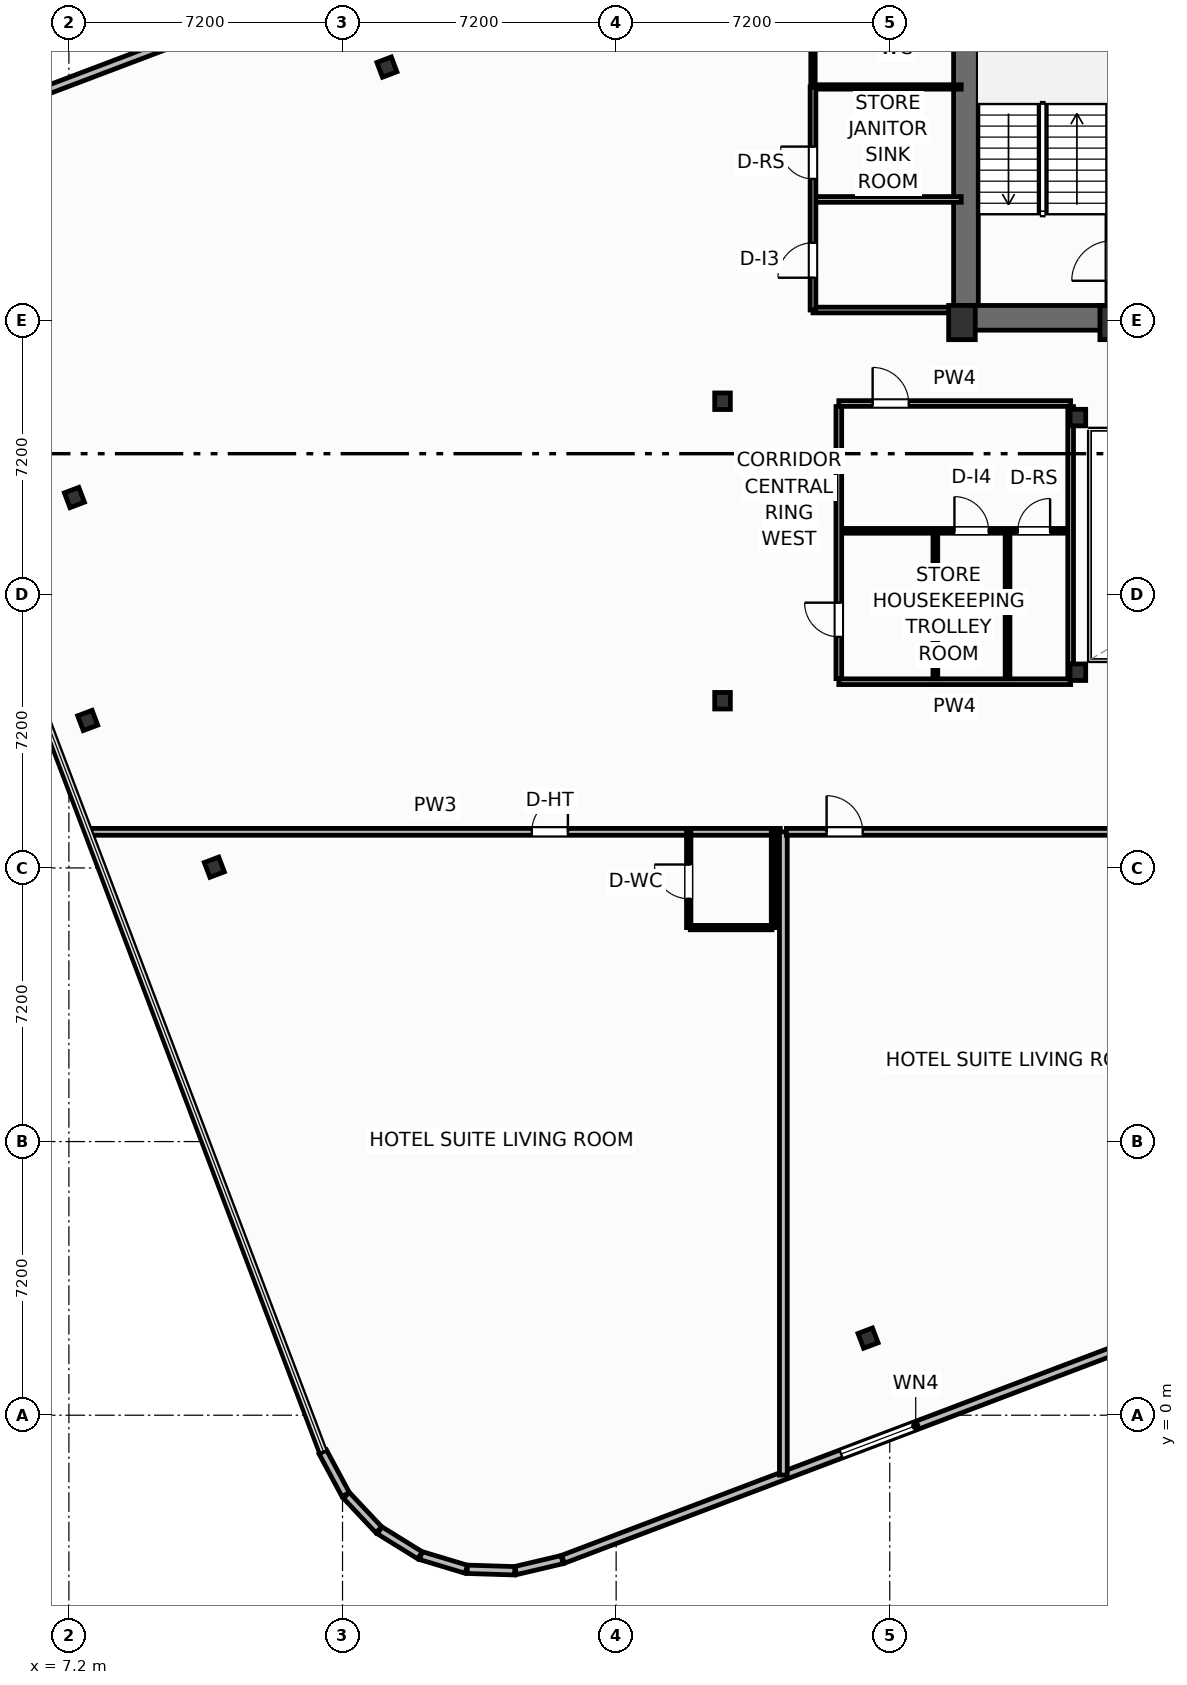
"""IFC4 building model, lengths in metres.
Left out: names, types, materials, properties, quantities, classifications, styles, units other than length and angle.
Written with IfcOpenShell. Run it as: python <this file> out.ifc"""

import sys

from ifc_helpers import new_model, si_unit, direction, frame, frame_2d, origin, origin_2d, place, context, subcontext, project, spatial, rectangle, i_section, extrude, element, fill, save


model = new_model("IFC4")
c1 = context("Model", 3, precision=1e-05, world=origin(), true_north=direction((0.0, 1.0)))
c2 = subcontext(c1, "Body", "Model", "MODEL_VIEW")
j1 = project(units=[si_unit("LENGTHUNIT", "METRE"), si_unit("PLANEANGLEUNIT", "RADIAN")], contexts=[c1])
p1 = place(None, origin())
s1 = spatial("IfcSite", under=j1, at=p1, CompositionType="ELEMENT")
p2 = place(p1, origin())
s2 = spatial("IfcBuilding", under=s1, at=p2, CompositionType="ELEMENT")
p3 = place(p2, frame((0.0, 0.0, 249.7)))
s3 = spatial("IfcBuildingStorey", under=s2, at=p3, CompositionType="ELEMENT", Elevation=249.7)
for number, where, z_axis, x_axis in (
    (1, (30.7, 28.75, 0.0), (0.0, 0.0, 1.0), (1.0, 0.0, 0.0)),
    (2, (34.68, 28.75, 0.0), (0.0, 0.0, 1.0), (1.0, 0.0, 0.0)),
):
    element("IfcColumn", number, at=place(p3, frame(where, z_axis=z_axis, x_axis=x_axis)), inside=s3, PredefinedType="COLUMN", context=c2, shape_type="SweptSolid", body=[
        extrude(rectangle(XDim=0.7, YDim=0.9, at=origin_2d()), origin(), (0.0, 0.0, 1.0), 3.7),
    ])
for number, where, z_axis, x_axis in (
    (3, (33.75, 19.55, 0.0), (0.0, 0.0, 1.0), (1.0, 0.0, 0.0)),
    (4, (33.75, 26.25, 0.0), (0.0, 0.0, 1.0), (1.0, 0.0, 0.0)),
    (5, (24.4, 18.8, 0.0), (0.0, 0.0, 1.0), (1.0, 0.0, 0.0)),
    (6, (24.4, 26.68, 0.0), (0.0, 0.0, 1.0), (1.0, 0.0, 0.0)),
):
    element("IfcColumn", number, at=place(p3, frame(where, z_axis=z_axis, x_axis=x_axis)), inside=s3, PredefinedType="COLUMN", context=c2, shape_type="SweptSolid", body=[
        extrude(i_section(OverallWidth=0.412, OverallDepth=0.435, WebThickness=0.036, FlangeThickness=0.057, FilletRadius=0.025, at=origin_2d()), origin(), (0.0, 0.0, 1.0), 3.7),
    ])
p4 = place(p3, frame((30.805, 29.2, 0.0), z_axis=(0.0, 0.0, 1.0), x_axis=(0.0, 1.0, 0.0)))
e7 = element("IfcWall", 7, at=p4, inside=s3, PredefinedType="SHEAR", context=c2, shape_type="SweptSolid", body=[
    extrude(rectangle(XDim=9.22, YDim=0.65, at=frame_2d((4.61, 0.0))), origin(), (0.0, 0.0, 1.0), 3.38),
])
p5 = place(p3, frame((30.48, 28.875, 0.0), z_axis=(0.0, 0.0, 1.0), x_axis=(1.0, 0.0, 0.0)))
e8 = element("IfcWall", 8, at=p5, inside=s3, PredefinedType="SHEAR", context=c2, shape_type="SweptSolid", body=[
    extrude(rectangle(XDim=4.32, YDim=0.65, at=frame_2d((2.16, 0.0))), origin(), (0.0, 0.0, 1.0), 3.38),
])
p6 = place(p3, frame((34.64, 29.2, 0.0), z_axis=(0.0, 0.0, 1.0), x_axis=(0.0, 1.0, 0.0)))
e9 = element("IfcWall", 9, at=p6, inside=s3, PredefinedType="SHEAR", context=c2, shape_type="SweptSolid", body=[
    extrude(rectangle(XDim=9.22, YDim=0.25, at=frame_2d((4.61, 0.0))), origin(), (0.0, 0.0, 1.0), 3.38),
])
p7 = place(p6, frame((0.65, 0.0, 0.0)))
e10 = element("IfcOpeningElement", 10, at=p7, cuts=e9, PredefinedType="OPENING", context=c2, shape_type="SweptSolid", body=[
    extrude(rectangle(XDim=1.05, YDim=2.15, at=frame_2d((0.525, 1.075))), frame((0.0, 0.135, 0.0), z_axis=(0.0, -1.0, 0.0), x_axis=(1.0, 0.0, 0.0)), (0.0, 0.0, 1.0), 0.27),
])
for number, where, z_axis, x_axis in (
    (11, (28.229, 2.028, 0.0), (0.0, 0.0, 1.0), (0.935, 0.354, 0.0)),
    (12, (15.568, 35.472, 0.0), (0.0, 0.0, 1.0), (0.935, 0.354, 0.0)),
    (13, (7.345, 24.146, 0.0), (0.0, 0.0, 1.0), (0.935, 0.354, 0.0)),
    (14, (7.695, 18.281, 0.0), (0.0, 0.0, 1.0), (0.935, 0.354, 0.0)),
    (15, (11.027, 14.42, 0.0), (0.0, 0.0, 1.0), (0.935, 0.354, 0.0)),
):
    element("IfcColumn", number, at=place(p3, frame(where, z_axis=z_axis, x_axis=x_axis)), inside=s3, PredefinedType="COLUMN", context=c2, shape_type="SweptSolid", body=[
        extrude(i_section(OverallWidth=0.406, OverallDepth=0.416, WebThickness=0.03, FlangeThickness=0.048, FilletRadius=0.025, at=origin_2d()), origin(), (0.0, 0.0, 1.0), 3.7),
    ])
p8 = place(p3, frame((13.881, -0.966, 0.0), z_axis=(0.0, 0.0, 1.0), x_axis=(0.473242342135, -0.88093228208, 0.0)))
e16 = element("IfcWall", 16, at=p8, inside=s3, PredefinedType="SOLIDWALL", context=c2, shape_type="SweptSolid", body=[
    extrude(rectangle(XDim=1.274, YDim=0.22, at=frame_2d((0.637, 0.0))), origin(), (0.0, 0.0, 1.0), 2.66),
])
for number, where, z_axis, x_axis in (
    (17, (14.5, -2.106, 0.0), (0.0, 0.0, 1.0), (0.685, -0.729, 0.0)),
    (18, (15.377, -3.029, 0.0), (0.0, 0.0, 1.0), (0.85, -0.526, 0.0)),
    (19, (16.463, -3.694, 0.0), (0.0, 0.0, 1.0), (0.958, -0.288, 0.0)),
):
    element("IfcWall", number, at=place(p3, frame(where, z_axis=z_axis, x_axis=x_axis)), inside=s3, PredefinedType="SOLIDWALL", context=c2, shape_type="SweptSolid", body=[
        extrude(rectangle(XDim=1.249, YDim=0.22, at=frame_2d((0.624, 0.0))), origin(), (0.0, 0.0, 1.0), 2.66),
    ])
p9 = place(p3, frame((17.683, -4.055, 0.0), z_axis=(0.0, 0.0, 1.0), x_axis=(0.999522886512, -0.030886879732, 0.0)))
e20 = element("IfcWall", 20, at=p9, inside=s3, PredefinedType="SOLIDWALL", context=c2, shape_type="SweptSolid", body=[
    extrude(rectangle(XDim=1.249, YDim=0.22, at=frame_2d((0.625, 0.0))), origin(), (0.0, 0.0, 1.0), 2.66),
])
p10 = place(p3, frame((18.956, -4.087, 0.0), z_axis=(0.0, 0.0, 1.0), x_axis=(0.973463008152, 0.228844426981, 0.0)))
e21 = element("IfcWall", 21, at=p10, inside=s3, PredefinedType="SOLIDWALL", context=c2, shape_type="SweptSolid", body=[
    extrude(rectangle(XDim=1.257, YDim=0.22, at=frame_2d((0.628, 0.0))), origin(), (0.0, 0.0, 1.0), 2.66),
])
p11 = place(p3, frame((20.202, -3.791, 0.0), z_axis=(0.0, 0.0, 1.0), x_axis=(0.935225574232, 0.354052432984, 0.0)))
e22 = element("IfcWall", 22, at=p11, inside=s3, PredefinedType="SOLIDWALL", context=c2, shape_type="SweptSolid", body=[
    extrude(rectangle(XDim=17.747, YDim=0.22, at=frame_2d((8.874, 0.0))), origin(), (0.0, 0.0, 1.0), 2.66),
])
p12 = place(p11, frame((7.823, 0.0, 0.8)))
e23 = element("IfcOpeningElement", 23, at=p12, cuts=e22, PredefinedType="OPENING", context=c2, shape_type="SweptSolid", body=[
    extrude(rectangle(XDim=2.1, YDim=1.75, at=frame_2d((1.05, 0.875))), frame((0.0, 0.12, 0.0), z_axis=(0.0, -1.0, 0.0), x_axis=(1.0, 0.0, 0.0)), (0.0, 0.0, 1.0), 0.24),
])
p13 = place(p3, frame((22.18, 40.755, 0.0), z_axis=(0.0, 0.0, 1.0), x_axis=(-0.935223867561, -0.354056941104, 0.0)))
e24 = element("IfcWall", 24, at=p13, inside=s3, PredefinedType="SOLIDWALL", context=c2, shape_type="SweptSolid", body=[
    extrude(rectangle(XDim=17.647, YDim=0.22, at=frame_2d((8.823, 0.0))), origin(), (0.0, 0.0, 1.0), 2.66),
])
p14 = place(p13, frame((7.774, 0.0, 0.8)))
e25 = element("IfcOpeningElement", 25, at=p14, cuts=e24, PredefinedType="OPENING", context=c2, shape_type="SweptSolid", body=[
    extrude(rectangle(XDim=2.1, YDim=1.75, at=frame_2d((1.05, 0.875))), frame((0.0, 0.12, 0.0), z_axis=(0.0, -1.0, 0.0), x_axis=(1.0, 0.0, 0.0)), (0.0, 0.0, 1.0), 0.24),
])
p15 = place(p3, frame((7.764, 15.35, 0.0), z_axis=(0.0, 0.0, 1.0), x_axis=(1.0, 0.0, 0.0)))
e26 = element("IfcWall", 26, at=p15, inside=s3, PredefinedType="PARTITIONING", context=c2, shape_type="SweptSolid", body=[
    extrude(rectangle(XDim=18.156, YDim=0.18, at=frame_2d((9.078, 0.0))), origin(), (0.0, 0.0, 1.0), 3.38),
])
p16 = place(p15, frame((11.617, 0.0, 0.0)))
e27 = element("IfcOpeningElement", 27, at=p16, cuts=e26, PredefinedType="OPENING", context=c2, shape_type="SweptSolid", body=[
    extrude(rectangle(XDim=0.95, YDim=2.15, at=frame_2d((0.475, 1.075))), frame((0.0, 0.1, 0.0), z_axis=(0.0, -1.0, 0.0), x_axis=(1.0, 0.0, 0.0)), (0.0, 0.0, 1.0), 0.2),
])
p17 = place(p3, frame((23.55, 12.83, 0.0), z_axis=(0.0, 0.0, 1.0), x_axis=(1.0, 0.0, 0.0)))
e28 = element("IfcWall", 28, at=p17, inside=s3, PredefinedType="PARTITIONING", context=c2, shape_type="SweptSolid", body=[
    extrude(rectangle(XDim=2.15, YDim=0.115, at=frame_2d((1.075, 0.0))), origin(), (0.0, 0.0, 1.0), 3.38),
])
p18 = place(p3, frame((23.51, 12.83, 0.0), z_axis=(0.0, 0.0, 1.0), x_axis=(0.0, 1.0, 0.0)))
e29 = element("IfcWall", 29, at=p18, inside=s3, PredefinedType="PARTITIONING", context=c2, shape_type="SweptSolid", body=[
    extrude(rectangle(XDim=2.52, YDim=0.115, at=frame_2d((1.26, 0.0))), origin(), (0.0, 0.0, 1.0), 3.38),
])
p19 = place(p18, frame((0.76, 0.0, 0.0)))
e30 = element("IfcOpeningElement", 30, at=p19, cuts=e29, PredefinedType="OPENING", context=c2, shape_type="SweptSolid", body=[
    extrude(rectangle(XDim=0.9, YDim=2.05, at=frame_2d((0.45, 1.025))), frame((0.0, 0.067, 0.0), z_axis=(0.0, -1.0, 0.0), x_axis=(1.0, 0.0, 0.0)), (0.0, 0.0, 1.0), 0.135),
])
p20 = place(p3, frame((25.74, 12.83, 0.0), z_axis=(0.0, 0.0, 1.0), x_axis=(0.0, 1.0, 0.0)))
e31 = element("IfcWall", 31, at=p20, inside=s3, PredefinedType="PARTITIONING", context=c2, shape_type="SweptSolid", body=[
    extrude(rectangle(XDim=2.52, YDim=0.115, at=frame_2d((1.26, 0.0))), origin(), (0.0, 0.0, 1.0), 1.165),
])
p21 = place(p3, frame((26.0, -1.574, 0.0), z_axis=(0.0, 0.0, 1.0), x_axis=(0.0, 1.0, 0.0)))
e32 = element("IfcWall", 32, at=p21, inside=s3, PredefinedType="PARTITIONING", context=c2, shape_type="SweptSolid", body=[
    extrude(rectangle(XDim=16.925, YDim=0.205, at=frame_2d((8.462, 0.0))), origin(), (0.0, 0.0, 1.0), 1.165),
])
p22 = place(p3, frame((26.08, 15.35, 0.0), z_axis=(0.0, 0.0, 1.0), x_axis=(1.0, 0.0, 0.0)))
e33 = element("IfcWall", 33, at=p22, inside=s3, PredefinedType="PARTITIONING", context=c2, shape_type="SweptSolid", body=[
    extrude(rectangle(XDim=13.84, YDim=0.18, at=frame_2d((6.92, 0.0))), origin(), (0.0, 0.0, 1.0), 3.38),
])
p23 = place(p22, frame((1.058, 0.0, 0.0)))
e34 = element("IfcOpeningElement", 34, at=p23, cuts=e33, PredefinedType="OPENING", context=c2, shape_type="SweptSolid", body=[
    extrude(rectangle(XDim=0.95, YDim=2.15, at=frame_2d((0.475, 1.075))), frame((0.0, 0.1, 0.0), z_axis=(0.0, -1.0, 0.0), x_axis=(1.0, 0.0, 0.0)), (0.0, 0.0, 1.0), 0.2),
])
p24 = place(p3, frame((27.46, 26.62, 0.0), z_axis=(0.0, 0.0, 1.0), x_axis=(1.0, 0.0, 0.0)))
e35 = element("IfcWall", 35, at=p24, inside=s3, PredefinedType="PARTITIONING", context=c2, shape_type="SweptSolid", body=[
    extrude(rectangle(XDim=6.1, YDim=0.15, at=frame_2d((3.05, 0.0))), origin(), (0.0, 0.0, 1.0), 2.592),
])
p25 = place(p24, frame((0.89, 0.0, 0.0)))
e36 = element("IfcOpeningElement", 36, at=p25, cuts=e35, PredefinedType="OPENING", context=c2, shape_type="SweptSolid", body=[
    extrude(rectangle(XDim=0.95, YDim=2.05, at=frame_2d((0.475, 1.025))), frame((0.0, 0.085, 0.0), z_axis=(0.0, -1.0, 0.0), x_axis=(1.0, 0.0, 0.0)), (0.0, 0.0, 1.0), 0.17),
])
p26 = place(p3, frame((27.46, 19.3, 0.0), z_axis=(0.0, 0.0, 1.0), x_axis=(1.0, 0.0, 0.0)))
e37 = element("IfcWall", 37, at=p26, inside=s3, PredefinedType="PARTITIONING", context=c2, shape_type="SweptSolid", body=[
    extrude(rectangle(XDim=6.1, YDim=0.15, at=frame_2d((3.05, 0.0))), origin(), (0.0, 0.0, 1.0), 2.592),
])
p27 = place(p3, frame((27.52, 23.27, 0.0), z_axis=(0.0, 0.0, 1.0), x_axis=(1.0, 0.0, 0.0)))
e38 = element("IfcWall", 38, at=p27, inside=s3, PredefinedType="PARTITIONING", context=c2, shape_type="SweptSolid", body=[
    extrude(rectangle(XDim=6.0, YDim=0.125, at=frame_2d((3.0, 0.0))), origin(), (0.0, 0.0, 1.0), 3.38),
])
p28 = place(p27, frame((2.982, 0.0, 0.0)))
e39 = element("IfcOpeningElement", 39, at=p28, cuts=e38, PredefinedType="OPENING", context=c2, shape_type="SweptSolid", body=[
    extrude(rectangle(XDim=0.9, YDim=2.05, at=frame_2d((0.45, 1.025))), frame((0.0, 0.073, 0.0), z_axis=(0.0, -1.0, 0.0), x_axis=(1.0, 0.0, 0.0)), (0.0, 0.0, 1.0), 0.145),
])
p29 = place(p27, frame((4.65, 0.0, 0.0)))
e40 = element("IfcOpeningElement", 40, at=p29, cuts=e38, PredefinedType="OPENING", context=c2, shape_type="SweptSolid", body=[
    extrude(rectangle(XDim=0.85, YDim=2.05, at=frame_2d((0.425, 1.025))), frame((0.0, 0.073, 0.0), z_axis=(0.0, -1.0, 0.0), x_axis=(1.0, 0.0, 0.0)), (0.0, 0.0, 1.0), 0.145),
])
for number, where, z_axis, x_axis in (
    (41, (30.0, 19.38, 0.0), (0.0, 0.0, 1.0), (0.0, 1.0, 0.0)),
    (42, (31.9, 19.38, 0.0), (0.0, 0.0, 1.0), (0.0, 1.0, 0.0)),
):
    element("IfcWall", number, at=place(p3, frame(where, z_axis=z_axis, x_axis=x_axis)), inside=s3, PredefinedType="PARTITIONING", context=c2, shape_type="SweptSolid", body=[
        extrude(rectangle(XDim=3.82, YDim=0.125, at=frame_2d((1.91, 0.0))), origin(), (0.0, 0.0, 1.0), 3.38),
    ])
p30 = place(p3, frame((27.46, 19.38, 0.0), z_axis=(0.0, 0.0, 1.0), x_axis=(0.0, 1.0, 0.0)))
e43 = element("IfcWall", 43, at=p30, inside=s3, PredefinedType="PARTITIONING", context=c2, shape_type="SweptSolid", body=[
    extrude(rectangle(XDim=7.16, YDim=0.15, at=frame_2d((3.58, 0.0))), origin(), (0.0, 0.0, 1.0), 3.38),
])
p31 = place(p30, frame((1.1, 0.0, 0.0)))
e44 = element("IfcOpeningElement", 44, at=p31, cuts=e43, PredefinedType="OPENING", context=c2, shape_type="SweptSolid", body=[
    extrude(rectangle(XDim=0.9, YDim=2.05, at=frame_2d((0.45, 1.025))), frame((0.0, 0.085, 0.0), z_axis=(0.0, -1.0, 0.0), x_axis=(1.0, 0.0, 0.0)), (0.0, 0.0, 1.0), 0.17),
])
p32 = place(p3, frame((33.56, 19.38, 0.0), z_axis=(0.0, 0.0, 1.0), x_axis=(0.0, 1.0, 0.0)))
e45 = element("IfcWall", 45, at=p32, inside=s3, PredefinedType="PARTITIONING", context=c2, shape_type="SweptSolid", body=[
    extrude(rectangle(XDim=7.16, YDim=0.15, at=frame_2d((3.58, 0.0))), origin(), (0.0, 0.0, 1.0), 2.754),
])
p33 = place(p3, frame((26.78, 29.08, 0.0), z_axis=(0.0, 0.0, 1.0), x_axis=(1.0, 0.0, 0.0)))
e46 = element("IfcWall", 46, at=p33, inside=s3, PredefinedType="PARTITIONING", context=c2, shape_type="SweptSolid", body=[
    extrude(rectangle(XDim=3.7, YDim=0.15, at=frame_2d((1.85, 0.0))), origin(), (0.0, 0.0, 1.0), 3.38),
])
p34 = place(p3, frame((26.8, 31.99, 0.0), z_axis=(0.0, 0.0, 1.0), x_axis=(1.0, 0.0, 0.0)))
e47 = element("IfcWall", 47, at=p34, inside=s3, PredefinedType="PARTITIONING", context=c2, shape_type="SweptSolid", body=[
    extrude(rectangle(XDim=3.88, YDim=0.15, at=frame_2d((1.94, 0.0))), origin(), (0.0, 0.0, 1.0), 3.38),
])
p35 = place(p3, frame((26.8, 34.95, 0.0), z_axis=(0.0, 0.0, 1.0), x_axis=(1.0, 0.0, 0.0)))
e48 = element("IfcWall", 48, at=p35, inside=s3, PredefinedType="PARTITIONING", context=c2, shape_type="SweptSolid", body=[
    extrude(rectangle(XDim=3.88, YDim=0.115, at=frame_2d((1.94, 0.0))), origin(), (0.0, 0.0, 1.0), 3.38),
])
p36 = place(p3, frame((26.78, 29.08, 0.0), z_axis=(0.0, 0.0, 1.0), x_axis=(0.0, 1.0, 0.0)))
e49 = element("IfcWall", 49, at=p36, inside=s3, PredefinedType="PARTITIONING", context=c2, shape_type="SweptSolid", body=[
    extrude(rectangle(XDim=5.87, YDim=0.15, at=frame_2d((2.935, 0.0))), origin(), (0.0, 0.0, 1.0), 3.38),
])
p37 = place(p36, frame((0.85, 0.0, 0.0)))
e50 = element("IfcOpeningElement", 50, at=p37, cuts=e49, PredefinedType="OPENING", context=c2, shape_type="SweptSolid", body=[
    extrude(rectangle(XDim=0.92, YDim=2.05, at=frame_2d((0.46, 1.025))), frame((0.0, 0.085, 0.0), z_axis=(0.0, -1.0, 0.0), x_axis=(1.0, 0.0, 0.0)), (0.0, 0.0, 1.0), 0.17),
])
p38 = place(p36, frame((3.45, 0.0, 0.0)))
e51 = element("IfcOpeningElement", 51, at=p38, cuts=e49, PredefinedType="OPENING", context=c2, shape_type="SweptSolid", body=[
    extrude(rectangle(XDim=0.85, YDim=2.05, at=frame_2d((0.425, 1.025))), frame((0.0, 0.085, 0.0), z_axis=(0.0, -1.0, 0.0), x_axis=(1.0, 0.0, 0.0)), (0.0, 0.0, 1.0), 0.17),
])
p39 = place(p3, frame((26.78, 34.95, 0.0), z_axis=(0.0, 0.0, 1.0), x_axis=(0.0, 1.0, 0.0)))
e52 = element("IfcWall", 52, at=p39, inside=s3, PredefinedType="PARTITIONING", context=c2, shape_type="SweptSolid", body=[
    extrude(rectangle(XDim=3.31, YDim=0.115, at=frame_2d((1.655, 0.0))), origin(), (0.0, 0.0, 1.0), 3.38),
])
p40 = place(p39, frame((1.05, 0.0, 0.0)))
e53 = element("IfcOpeningElement", 53, at=p40, cuts=e52, PredefinedType="OPENING", context=c2, shape_type="SweptSolid", body=[
    extrude(rectangle(XDim=0.9, YDim=2.05, at=frame_2d((0.45, 1.025))), frame((0.0, 0.067, 0.0), z_axis=(0.0, -1.0, 0.0), x_axis=(1.0, 0.0, 0.0)), (0.0, 0.0, 1.0), 0.135),
])
p41 = place(p12, origin())
e54 = element("IfcWindow", 54, at=p41, inside=s3, PartitioningType="SINGLE_PANEL", PredefinedType="WINDOW", context=c2, shape_type="SweptSolid", body=[
    extrude(rectangle(XDim=2.1, YDim=1.75, at=frame_2d((1.05, 0.875))), frame((0.0, 0.03, 0.0), z_axis=(0.0, -1.0, 0.0), x_axis=(1.0, 0.0, 0.0)), (0.0, 0.0, 1.0), 0.06),
])
fill(e23, e54)
p42 = place(p16, origin())
e55 = element("IfcDoor", 55, at=p42, inside=s3, OperationType="SINGLE_SWING_RIGHT", PredefinedType="DOOR", context=c2, shape_type="SweptSolid", body=[
    extrude(rectangle(XDim=0.95, YDim=2.15, at=frame_2d((0.475, 1.075))), frame((0.0, 0.025, 0.0), z_axis=(0.0, -1.0, 0.0), x_axis=(1.0, 0.0, 0.0)), (0.0, 0.0, 1.0), 0.05),
])
fill(e27, e55)
p43 = place(p19, origin())
e56 = element("IfcDoor", 56, at=p43, inside=s3, OperationType="SINGLE_SWING_RIGHT", PredefinedType="DOOR", context=c2, shape_type="SweptSolid", body=[
    extrude(rectangle(XDim=0.9, YDim=2.05, at=frame_2d((0.45, 1.025))), frame((0.0, 0.025, 0.0), z_axis=(0.0, -1.0, 0.0), x_axis=(1.0, 0.0, 0.0)), (0.0, 0.0, 1.0), 0.05),
])
fill(e30, e56)
p44 = place(p23, origin())
e57 = element("IfcDoor", 57, at=p44, inside=s3, OperationType="SINGLE_SWING_LEFT", PredefinedType="DOOR", context=c2, shape_type="SweptSolid", body=[
    extrude(rectangle(XDim=0.95, YDim=2.15, at=frame_2d((0.475, 1.075))), frame((0.0, 0.025, 0.0), z_axis=(0.0, -1.0, 0.0), x_axis=(1.0, 0.0, 0.0)), (0.0, 0.0, 1.0), 0.05),
])
fill(e34, e57)
p45 = place(p25, origin())
e58 = element("IfcDoor", 58, at=p45, inside=s3, OperationType="SINGLE_SWING_LEFT", PredefinedType="DOOR", context=c2, shape_type="SweptSolid", body=[
    extrude(rectangle(XDim=0.95, YDim=2.05, at=frame_2d((0.475, 1.025))), frame((0.0, 0.025, 0.0), z_axis=(0.0, -1.0, 0.0), x_axis=(1.0, 0.0, 0.0)), (0.0, 0.0, 1.0), 0.05),
])
fill(e36, e58)
p46 = place(p28, origin())
e59 = element("IfcDoor", 59, at=p46, inside=s3, OperationType="SINGLE_SWING_LEFT", PredefinedType="DOOR", context=c2, shape_type="SweptSolid", body=[
    extrude(rectangle(XDim=0.9, YDim=2.05, at=frame_2d((0.45, 1.025))), frame((0.0, 0.025, 0.0), z_axis=(0.0, -1.0, 0.0), x_axis=(1.0, 0.0, 0.0)), (0.0, 0.0, 1.0), 0.05),
])
fill(e39, e59)
p47 = place(p29, origin())
e60 = element("IfcDoor", 60, at=p47, inside=s3, OperationType="SINGLE_SWING_RIGHT", PredefinedType="DOOR", context=c2, shape_type="SweptSolid", body=[
    extrude(rectangle(XDim=0.85, YDim=2.05, at=frame_2d((0.425, 1.025))), frame((0.0, 0.025, 0.0), z_axis=(0.0, -1.0, 0.0), x_axis=(1.0, 0.0, 0.0)), (0.0, 0.0, 1.0), 0.05),
])
fill(e40, e60)
p48 = place(p31, origin())
e61 = element("IfcDoor", 61, at=p48, inside=s3, OperationType="SINGLE_SWING_RIGHT", PredefinedType="DOOR", context=c2, shape_type="SweptSolid", body=[
    extrude(rectangle(XDim=0.9, YDim=2.05, at=frame_2d((0.45, 1.025))), frame((0.0, 0.025, 0.0), z_axis=(0.0, -1.0, 0.0), x_axis=(1.0, 0.0, 0.0)), (0.0, 0.0, 1.0), 0.05),
])
fill(e44, e61)
p49 = place(p37, origin())
e62 = element("IfcDoor", 62, at=p49, inside=s3, OperationType="SINGLE_SWING_LEFT", PredefinedType="DOOR", context=c2, shape_type="SweptSolid", body=[
    extrude(rectangle(XDim=0.92, YDim=2.05, at=frame_2d((0.46, 1.025))), frame((0.0, 0.025, 0.0), z_axis=(0.0, -1.0, 0.0), x_axis=(1.0, 0.0, 0.0)), (0.0, 0.0, 1.0), 0.05),
])
fill(e50, e62)
p50 = place(p38, origin())
e63 = element("IfcDoor", 63, at=p50, inside=s3, OperationType="SINGLE_SWING_RIGHT", PredefinedType="DOOR", context=c2, shape_type="SweptSolid", body=[
    extrude(rectangle(XDim=0.85, YDim=2.05, at=frame_2d((0.425, 1.025))), frame((0.0, 0.025, 0.0), z_axis=(0.0, -1.0, 0.0), x_axis=(1.0, 0.0, 0.0)), (0.0, 0.0, 1.0), 0.05),
])
fill(e51, e63)
save(model, sys.argv[1])
